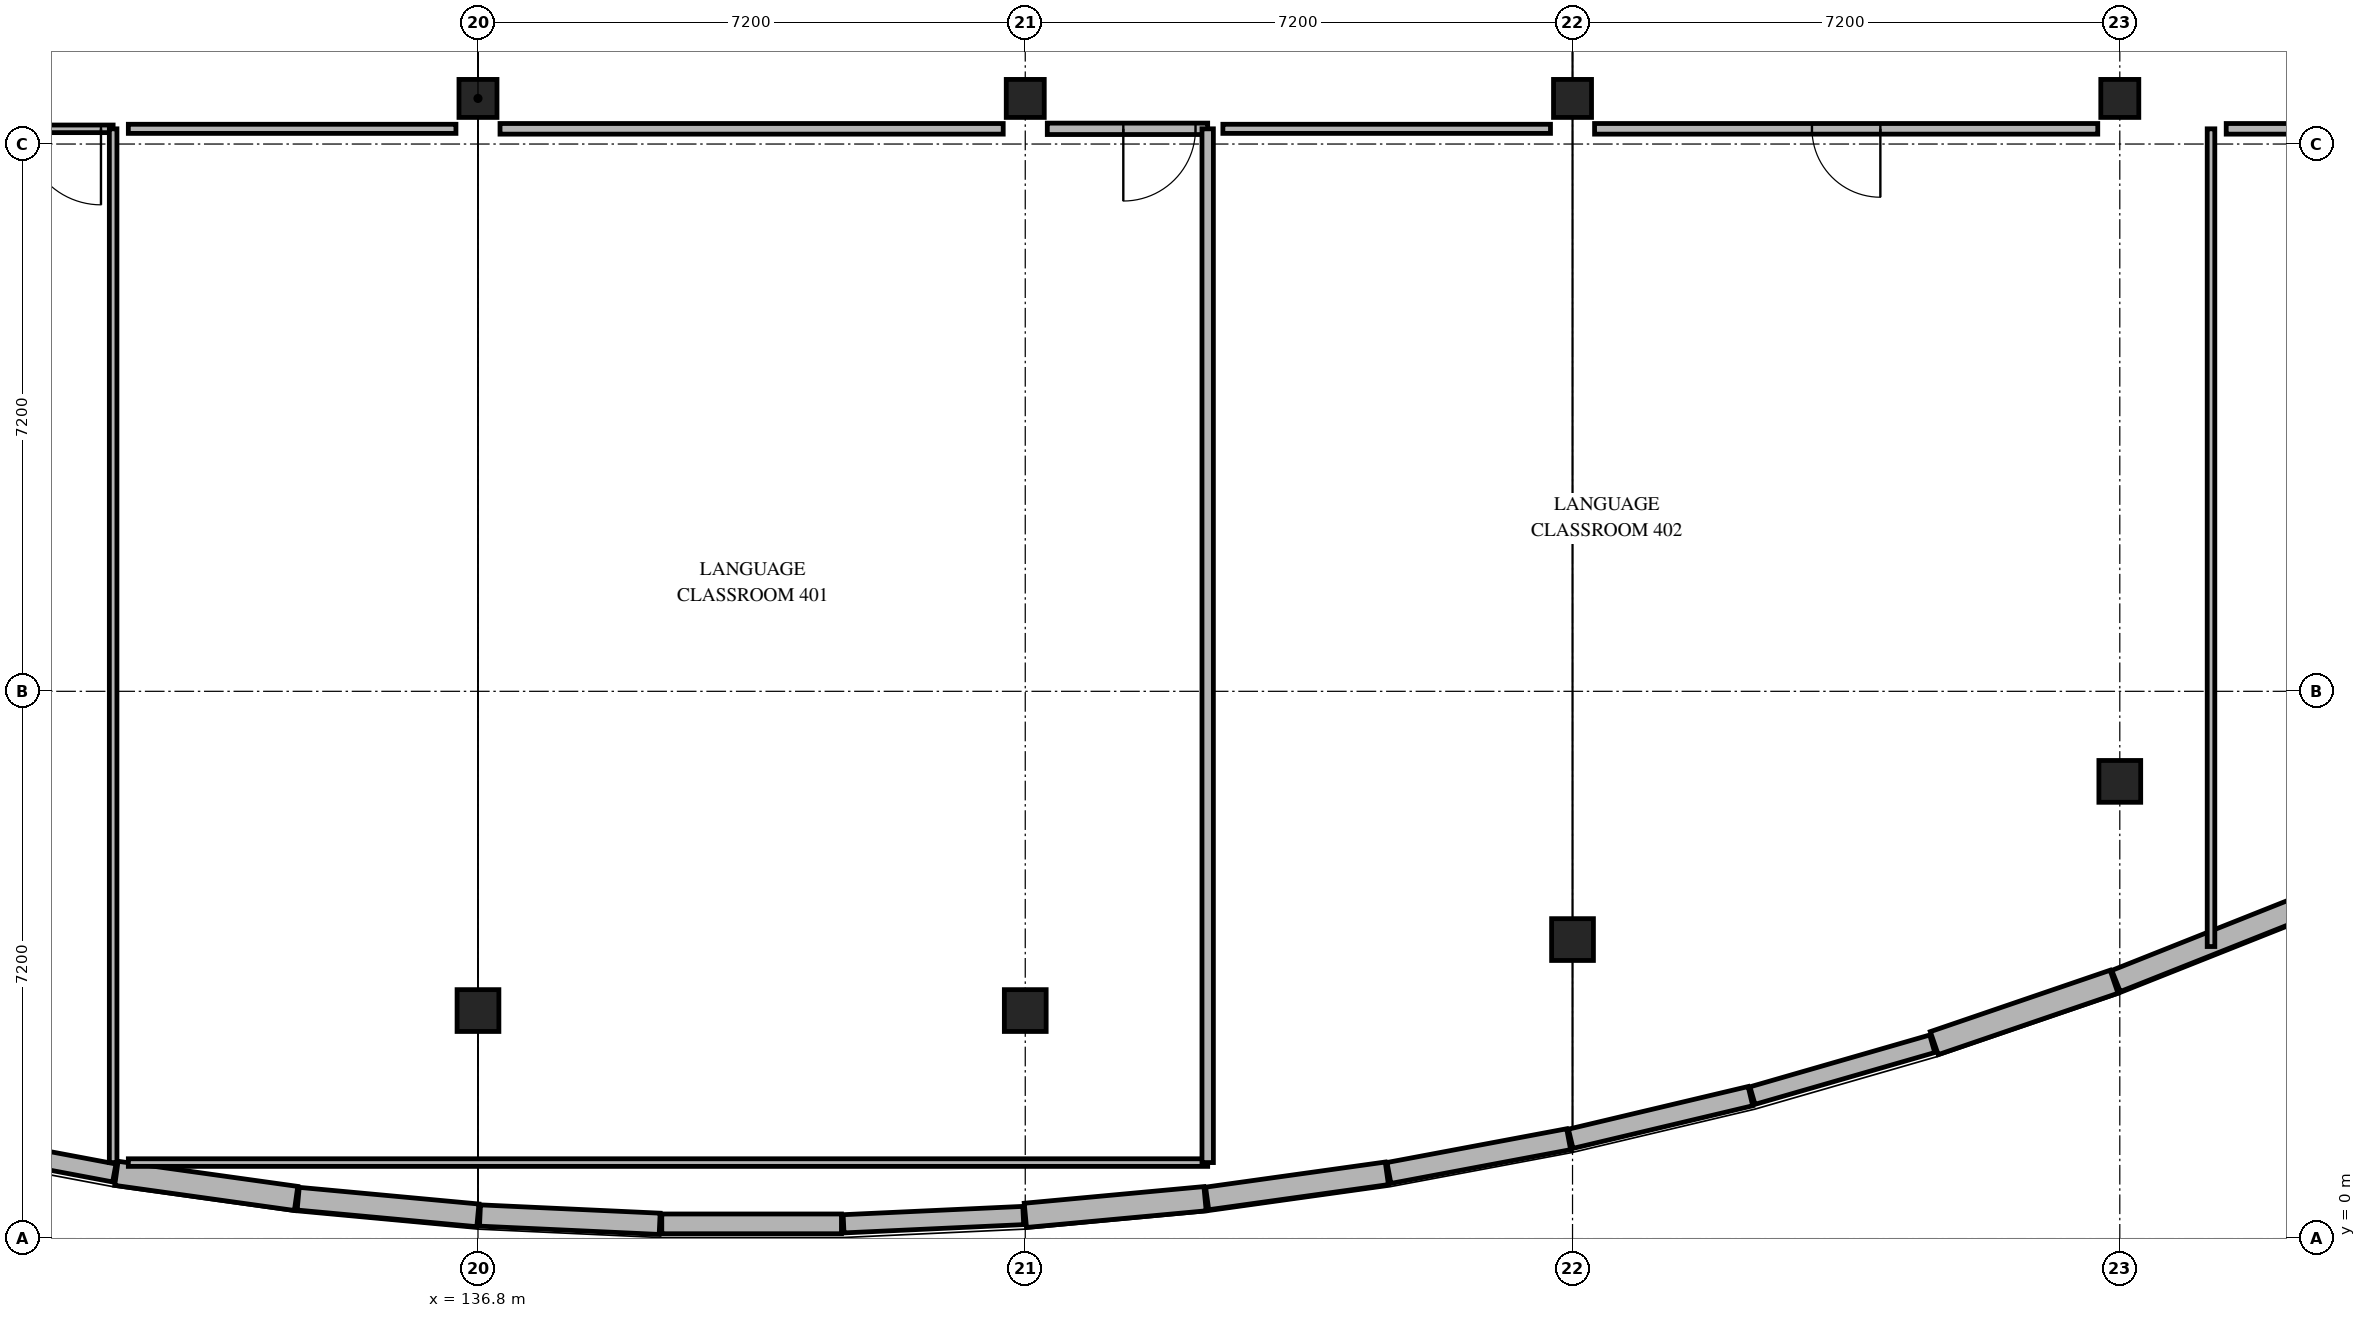
"""IFC4 building model, lengths in metres.
Left out: names, types, materials, properties, quantities, classifications, styles, units other than length and angle.
Written with IfcOpenShell. Run it as: python <this file> out.ifc"""

import sys

from ifc_helpers import new_model, si_unit, direction, frame, frame_2d, origin, origin_2d, place, context, subcontext, project, spatial, rectangle, extrude, element, fill, save


model = new_model("IFC4")
c1 = context("Model", 3, precision=1e-05, world=origin(), true_north=direction((0.0, 1.0)))
c2 = subcontext(c1, "Body", "Model", "MODEL_VIEW")
j1 = project(units=[si_unit("LENGTHUNIT", "METRE"), si_unit("PLANEANGLEUNIT", "RADIAN")], contexts=[c1])
p1 = place(None, origin())
s1 = spatial("IfcSite", under=j1, at=p1, CompositionType="ELEMENT")
p2 = place(p1, origin())
s2 = spatial("IfcBuilding", under=s1, at=p2, CompositionType="ELEMENT")
p3 = place(p2, frame((0.0, 0.0, 16.8)))
s3 = spatial("IfcBuildingStorey", under=s2, at=p3, CompositionType="ELEMENT", Elevation=16.8)
p4 = place(p3, frame((136.8, 3.0, 0.0), z_axis=(0.0, 0.0, 1.0), x_axis=(1.0, 0.0, 0.0)))
e1 = element("IfcColumn", 1, at=p4, inside=s3, PredefinedType="COLUMN", context=c2, shape_type="SweptSolid", body=[
    extrude(rectangle(XDim=0.55, YDim=0.55, at=origin_2d()), origin(), (0.0, 0.0, 1.0), 3.9),
])
p5 = place(p3, frame((136.8, 15.0, 0.0), z_axis=(0.0, 0.0, 1.0), x_axis=(1.0, 0.0, 0.0)))
e2 = element("IfcColumn", 2, at=p5, inside=s3, PredefinedType="COLUMN", context=c2, shape_type="SweptSolid", body=[
    extrude(rectangle(XDim=0.5, YDim=0.5, at=origin_2d()), origin(), (0.0, 0.0, 1.0), 3.9),
])
p6 = place(p3, frame((144.0, 3.0, 0.0), z_axis=(0.0, 0.0, 1.0), x_axis=(1.0, 0.0, 0.0)))
e3 = element("IfcColumn", 3, at=p6, inside=s3, PredefinedType="COLUMN", context=c2, shape_type="SweptSolid", body=[
    extrude(rectangle(XDim=0.55, YDim=0.55, at=origin_2d()), origin(), (0.0, 0.0, 1.0), 3.9),
])
p7 = place(p3, frame((144.0, 15.0, 0.0), z_axis=(0.0, 0.0, 1.0), x_axis=(1.0, 0.0, 0.0)))
e4 = element("IfcColumn", 4, at=p7, inside=s3, PredefinedType="COLUMN", context=c2, shape_type="SweptSolid", body=[
    extrude(rectangle(XDim=0.5, YDim=0.5, at=origin_2d()), origin(), (0.0, 0.0, 1.0), 3.9),
])
p8 = place(p3, frame((151.2, 3.934, 0.0), z_axis=(0.0, 0.0, 1.0), x_axis=(1.0, 0.0, 0.0)))
e5 = element("IfcColumn", 5, at=p8, inside=s3, PredefinedType="COLUMN", context=c2, shape_type="SweptSolid", body=[
    extrude(rectangle(XDim=0.55, YDim=0.55, at=origin_2d()), origin(), (0.0, 0.0, 1.0), 3.9),
])
p9 = place(p3, frame((151.2, 15.0, 0.0), z_axis=(0.0, 0.0, 1.0), x_axis=(1.0, 0.0, 0.0)))
e6 = element("IfcColumn", 6, at=p9, inside=s3, PredefinedType="COLUMN", context=c2, shape_type="SweptSolid", body=[
    extrude(rectangle(XDim=0.5, YDim=0.5, at=origin_2d()), origin(), (0.0, 0.0, 1.0), 3.9),
])
p10 = place(p3, frame((158.4, 6.015, 0.0), z_axis=(0.0, 0.0, 1.0), x_axis=(1.0, 0.0, 0.0)))
e7 = element("IfcColumn", 7, at=p10, inside=s3, PredefinedType="COLUMN", context=c2, shape_type="SweptSolid", body=[
    extrude(rectangle(XDim=0.55, YDim=0.55, at=origin_2d()), origin(), (0.0, 0.0, 1.0), 3.9),
])
p11 = place(p3, frame((158.4, 15.0, 0.0), z_axis=(0.0, 0.0, 1.0), x_axis=(1.0, 0.0, 0.0)))
e8 = element("IfcColumn", 8, at=p11, inside=s3, PredefinedType="COLUMN", context=c2, shape_type="SweptSolid", body=[
    extrude(rectangle(XDim=0.5, YDim=0.5, at=origin_2d()), origin(), (0.0, 0.0, 1.0), 3.9),
])
p12 = place(p3, frame((132.015, 0.863, 0.0), z_axis=(0.0, 0.0, 1.0), x_axis=(-0.982797435053, 0.184686766319, 0.0)))
e9 = element("IfcWall", 9, at=p12, inside=s3, PredefinedType="SOLIDWALL", context=c2, shape_type="SweptSolid", body=[
    extrude(rectangle(XDim=2.406, YDim=0.24, at=frame_2d((1.203, 0.0))), origin(), (0.0, 0.0, 1.0), 3.68),
])
p13 = place(p3, frame((134.407, 0.528, 0.0), z_axis=(0.0, 0.0, 1.0), x_axis=(-0.990366445451, 0.138471310114, 0.0)))
e10 = element("IfcWall", 10, at=p13, inside=s3, PredefinedType="SOLIDWALL", context=c2, shape_type="SweptSolid", body=[
    extrude(rectangle(XDim=2.387, YDim=0.32, at=frame_2d((1.194, 0.0))), origin(), (0.0, 0.0, 1.0), 3.68),
])
p14 = place(p3, frame((136.799, 0.306, 0.0), z_axis=(0.0, 0.0, 1.0), x_axis=(-0.995727201859, 0.092343594678, 0.0)))
e11 = element("IfcWall", 11, at=p14, inside=s3, PredefinedType="SOLIDWALL", context=c2, shape_type="SweptSolid", body=[
    extrude(rectangle(XDim=2.374, YDim=0.3, at=frame_2d((1.187, 0.0))), origin(), (0.0, 0.0, 1.0), 3.68),
])
p15 = place(p3, frame((139.19, 0.195, 0.0), z_axis=(0.0, 0.0, 1.0), x_axis=(-0.998935951808, 0.046119021944, 0.0)))
e12 = element("IfcWall", 12, at=p15, inside=s3, PredefinedType="SOLIDWALL", context=c2, shape_type="SweptSolid", body=[
    extrude(rectangle(XDim=2.366, YDim=0.28, at=frame_2d((1.183, 0.0))), origin(), (0.0, 0.0, 1.0), 3.68),
])
p16 = place(p3, frame((141.582, 0.194, 0.0), z_axis=(0.0, 0.0, 1.0), x_axis=(-1.0, 0.0, 0.0)))
e13 = element("IfcWall", 13, at=p16, inside=s3, PredefinedType="SOLIDWALL", context=c2, shape_type="SweptSolid", body=[
    extrude(rectangle(XDim=2.364, YDim=0.26, at=frame_2d((1.182, 0.0))), origin(), (0.0, 0.0, 1.0), 3.68),
])
p17 = place(p3, frame((143.974, 0.304, 0.0), z_axis=(0.0, 0.0, 1.0), x_axis=(-0.998936171223, -0.046114269187, 0.0)))
e14 = element("IfcWall", 14, at=p17, inside=s3, PredefinedType="SOLIDWALL", context=c2, shape_type="SweptSolid", body=[
    extrude(rectangle(XDim=2.366, YDim=0.24, at=frame_2d((1.183, 0.0))), origin(), (0.0, 0.0, 1.0), 3.68),
])
p18 = place(p3, frame((146.365, 0.525, 0.0), z_axis=(0.0, 0.0, 1.0), x_axis=(-0.995728078612, -0.092334140293, 0.0)))
e15 = element("IfcWall", 15, at=p18, inside=s3, PredefinedType="SOLIDWALL", context=c2, shape_type="SweptSolid", body=[
    extrude(rectangle(XDim=2.375, YDim=0.32, at=frame_2d((1.187, 0.0))), origin(), (0.0, 0.0, 1.0), 3.68),
])
p19 = place(p3, frame((148.757, 0.859, 0.0), z_axis=(0.0, 0.0, 1.0), x_axis=(-0.990368406077, -0.138457286714, 0.0)))
e16 = element("IfcWall", 16, at=p19, inside=s3, PredefinedType="SOLIDWALL", context=c2, shape_type="SweptSolid", body=[
    extrude(rectangle(XDim=2.387, YDim=0.3, at=frame_2d((1.194, 0.0))), origin(), (0.0, 0.0, 1.0), 3.68),
])
p20 = place(p3, frame((151.149, 1.308, 0.0), z_axis=(0.0, 0.0, 1.0), x_axis=(-0.982800895809, -0.184668349202, 0.0)))
e17 = element("IfcWall", 17, at=p20, inside=s3, PredefinedType="SOLIDWALL", context=c2, shape_type="SweptSolid", body=[
    extrude(rectangle(XDim=2.406, YDim=0.28, at=frame_2d((1.203, 0.0))), origin(), (0.0, 0.0, 1.0), 3.68),
])
p21 = place(p3, frame((153.541, 1.874, 0.0), z_axis=(0.0, 0.0, 1.0), x_axis=(-0.973001991893, -0.230796715253, 0.0)))
e18 = element("IfcWall", 18, at=p21, inside=s3, PredefinedType="SOLIDWALL", context=c2, shape_type="SweptSolid", body=[
    extrude(rectangle(XDim=2.431, YDim=0.26, at=frame_2d((1.215, 0.0))), origin(), (0.0, 0.0, 1.0), 3.68),
])
p22 = place(p3, frame((155.933, 2.563, 0.0), z_axis=(0.0, 0.0, 1.0), x_axis=(-0.960873855282, -0.276986343049, 0.0)))
e19 = element("IfcWall", 19, at=p22, inside=s3, PredefinedType="SOLIDWALL", context=c2, shape_type="SweptSolid", body=[
    extrude(rectangle(XDim=2.462, YDim=0.24, at=frame_2d((1.231, 0.0))), origin(), (0.0, 0.0, 1.0), 3.68),
])
p23 = place(p3, frame((158.325, 3.379, 0.0), z_axis=(0.0, 0.0, 1.0), x_axis=(-0.946323632671, -0.323220640196, 0.0)))
e20 = element("IfcWall", 20, at=p23, inside=s3, PredefinedType="SOLIDWALL", context=c2, shape_type="SweptSolid", body=[
    extrude(rectangle(XDim=2.5, YDim=0.32, at=frame_2d((1.25, 0.0))), origin(), (0.0, 0.0, 1.0), 3.68),
])
p24 = place(p3, frame((160.717, 4.329, 0.0), z_axis=(0.0, 0.0, 1.0), x_axis=(-0.929287640724, -0.369356847504, 0.0)))
e21 = element("IfcWall", 21, at=p24, inside=s3, PredefinedType="SOLIDWALL", context=c2, shape_type="SweptSolid", body=[
    extrude(rectangle(XDim=2.547, YDim=0.3, at=frame_2d((1.273, 0.0))), origin(), (0.0, 0.0, 1.0), 3.08),
])
p25 = place(p3, frame((132.0, 14.6, 0.0), z_axis=(0.0, 0.0, 1.0), x_axis=(-1.0, 0.0, 0.0)))
e22 = element("IfcWall", 22, at=p25, inside=s3, PredefinedType="PARTITIONING", context=c2, shape_type="SweptSolid", body=[
    extrude(rectangle(XDim=2.11, YDim=0.1, at=frame_2d((1.055, 0.0))), origin(), (0.0, 0.0, 1.0), 3.68),
])
p26 = place(p25, frame((0.16, 0.0, 0.0)))
e23 = element("IfcOpeningElement", 23, at=p26, cuts=e22, PredefinedType="OPENING", context=c2, shape_type="SweptSolid", body=[
    extrude(rectangle(XDim=1.0, YDim=2.15, at=frame_2d((0.5, 1.075))), frame((0.0, 0.06, 0.0), z_axis=(0.0, -1.0, 0.0), x_axis=(1.0, 0.0, 0.0)), (0.0, 0.0, 1.0), 0.12),
])
p27 = place(p3, frame((132.0, 1.0, 0.0), z_axis=(0.0, 0.0, 1.0), x_axis=(0.0, 1.0, 0.0)))
e24 = element("IfcWall", 24, at=p27, inside=s3, PredefinedType="PARTITIONING", context=c2, shape_type="SweptSolid", body=[
    extrude(rectangle(XDim=13.6, YDim=0.1, at=frame_2d((6.8, 0.0))), origin(), (0.0, 0.0, 1.0), 3.08),
])
p28 = place(p3, frame((146.4, 14.6, 0.0), z_axis=(0.0, 0.0, 1.0), x_axis=(-1.0, 0.0, 0.0)))
e25 = element("IfcWall", 25, at=p28, inside=s3, PredefinedType="PARTITIONING", context=c2, shape_type="SweptSolid", body=[
    extrude(rectangle(XDim=2.11, YDim=0.15, at=frame_2d((1.055, 0.0))), origin(), (0.0, 0.0, 1.0), 3.68),
])
p29 = place(p28, frame((0.16, 0.0, 0.0)))
e26 = element("IfcOpeningElement", 26, at=p29, cuts=e25, PredefinedType="OPENING", context=c2, shape_type="SweptSolid", body=[
    extrude(rectangle(XDim=0.95, YDim=2.15, at=frame_2d((0.475, 1.075))), frame((0.0, 0.085, 0.0), z_axis=(0.0, -1.0, 0.0), x_axis=(1.0, 0.0, 0.0)), (0.0, 0.0, 1.0), 0.17),
])
p30 = place(p3, frame((143.71, 14.6, 0.0), z_axis=(0.0, 0.0, 1.0), x_axis=(-1.0, 0.0, 0.0)))
e27 = element("IfcWall", 27, at=p30, inside=s3, PredefinedType="PARTITIONING", context=c2, shape_type="SweptSolid", body=[
    extrude(rectangle(XDim=6.62, YDim=0.14, at=frame_2d((3.31, 0.0))), origin(), (0.0, 0.0, 1.0), 3.68),
])
p31 = place(p3, frame((136.51, 14.6, 0.0), z_axis=(0.0, 0.0, 1.0), x_axis=(-1.0, 0.0, 0.0)))
e28 = element("IfcWall", 28, at=p31, inside=s3, PredefinedType="PARTITIONING", context=c2, shape_type="SweptSolid", body=[
    extrude(rectangle(XDim=4.31, YDim=0.12, at=frame_2d((2.155, 0.0))), origin(), (0.0, 0.0, 1.0), 3.68),
])
p32 = place(p3, frame((132.2, 1.0, 0.0), z_axis=(0.0, 0.0, 1.0), x_axis=(1.0, 0.0, 0.0)))
e29 = element("IfcWall", 29, at=p32, inside=s3, PredefinedType="PARTITIONING", context=c2, shape_type="SweptSolid", body=[
    extrude(rectangle(XDim=14.2, YDim=0.1, at=frame_2d((7.1, 0.0))), origin(), (0.0, 0.0, 1.0), 3.68),
])
p33 = place(p3, frame((146.4, 1.0, 0.0), z_axis=(0.0, 0.0, 1.0), x_axis=(0.0, 1.0, 0.0)))
e30 = element("IfcWall", 30, at=p33, inside=s3, PredefinedType="PARTITIONING", context=c2, shape_type="SweptSolid", body=[
    extrude(rectangle(XDim=13.6, YDim=0.15, at=frame_2d((6.8, 0.0))), origin(), (0.0, 0.0, 1.0), 3.08),
])
p34 = place(p3, frame((158.11, 14.6, 0.0), z_axis=(0.0, 0.0, 1.0), x_axis=(-1.0, 0.0, 0.0)))
e31 = element("IfcWall", 31, at=p34, inside=s3, PredefinedType="PARTITIONING", context=c2, shape_type="SweptSolid", body=[
    extrude(rectangle(XDim=6.62, YDim=0.14, at=frame_2d((3.31, 0.0))), origin(), (0.0, 0.0, 1.0), 3.68),
])
p35 = place(p34, frame((2.86, 0.0, 0.0)))
e32 = element("IfcOpeningElement", 32, at=p35, cuts=e31, PredefinedType="OPENING", context=c2, shape_type="SweptSolid", body=[
    extrude(rectangle(XDim=0.9, YDim=2.1, at=frame_2d((0.45, 1.05))), frame((0.0, 0.08, 0.0), z_axis=(0.0, -1.0, 0.0), x_axis=(1.0, 0.0, 0.0)), (0.0, 0.0, 1.0), 0.16),
])
p36 = place(p3, frame((150.91, 14.6, 0.0), z_axis=(0.0, 0.0, 1.0), x_axis=(-1.0, 0.0, 0.0)))
e33 = element("IfcWall", 33, at=p36, inside=s3, PredefinedType="PARTITIONING", context=c2, shape_type="SweptSolid", body=[
    extrude(rectangle(XDim=4.31, YDim=0.12, at=frame_2d((2.155, 0.0))), origin(), (0.0, 0.0, 1.0), 3.68),
])
p37 = place(p3, frame((159.6, 3.842, 0.0), z_axis=(0.0, 0.0, 1.0), x_axis=(0.0, 1.0, 0.0)))
e34 = element("IfcWall", 34, at=p37, inside=s3, PredefinedType="PARTITIONING", context=c2, shape_type="SweptSolid", body=[
    extrude(rectangle(XDim=10.758, YDim=0.1, at=frame_2d((5.379, 0.0))), origin(), (0.0, 0.0, 1.0), 3.08),
])
p38 = place(p3, frame((165.31, 14.6, 0.0), z_axis=(0.0, 0.0, 1.0), x_axis=(-1.0, 0.0, 0.0)))
e35 = element("IfcWall", 35, at=p38, inside=s3, PredefinedType="PARTITIONING", context=c2, shape_type="SweptSolid", body=[
    extrude(rectangle(XDim=5.51, YDim=0.14, at=frame_2d((2.755, 0.0))), origin(), (0.0, 0.0, 1.0), 3.68),
])
p39 = place(p26, origin())
e36 = element("IfcDoor", 36, at=p39, inside=s3, OperationType="SINGLE_SWING_LEFT", PredefinedType="DOOR", context=c2, shape_type="SweptSolid", body=[
    extrude(rectangle(XDim=1.0, YDim=2.15, at=frame_2d((0.5, 1.075))), frame((0.0, 0.025, 0.0), z_axis=(0.0, -1.0, 0.0), x_axis=(1.0, 0.0, 0.0)), (0.0, 0.0, 1.0), 0.05),
])
fill(e23, e36)
p40 = place(p29, origin())
e37 = element("IfcDoor", 37, at=p40, inside=s3, OperationType="SINGLE_SWING_RIGHT", PredefinedType="DOOR", context=c2, shape_type="SweptSolid", body=[
    extrude(rectangle(XDim=0.95, YDim=2.15, at=frame_2d((0.475, 1.075))), frame((0.0, 0.025, 0.0), z_axis=(0.0, -1.0, 0.0), x_axis=(1.0, 0.0, 0.0)), (0.0, 0.0, 1.0), 0.05),
])
fill(e26, e37)
p41 = place(p35, origin())
e38 = element("IfcDoor", 38, at=p41, inside=s3, OperationType="SINGLE_SWING_LEFT", PredefinedType="DOOR", context=c2, shape_type="SweptSolid", body=[
    extrude(rectangle(XDim=0.9, YDim=2.1, at=frame_2d((0.45, 1.05))), frame((0.0, 0.025, 0.0), z_axis=(0.0, -1.0, 0.0), x_axis=(1.0, 0.0, 0.0)), (0.0, 0.0, 1.0), 0.05),
])
fill(e32, e38)
save(model, sys.argv[1])
